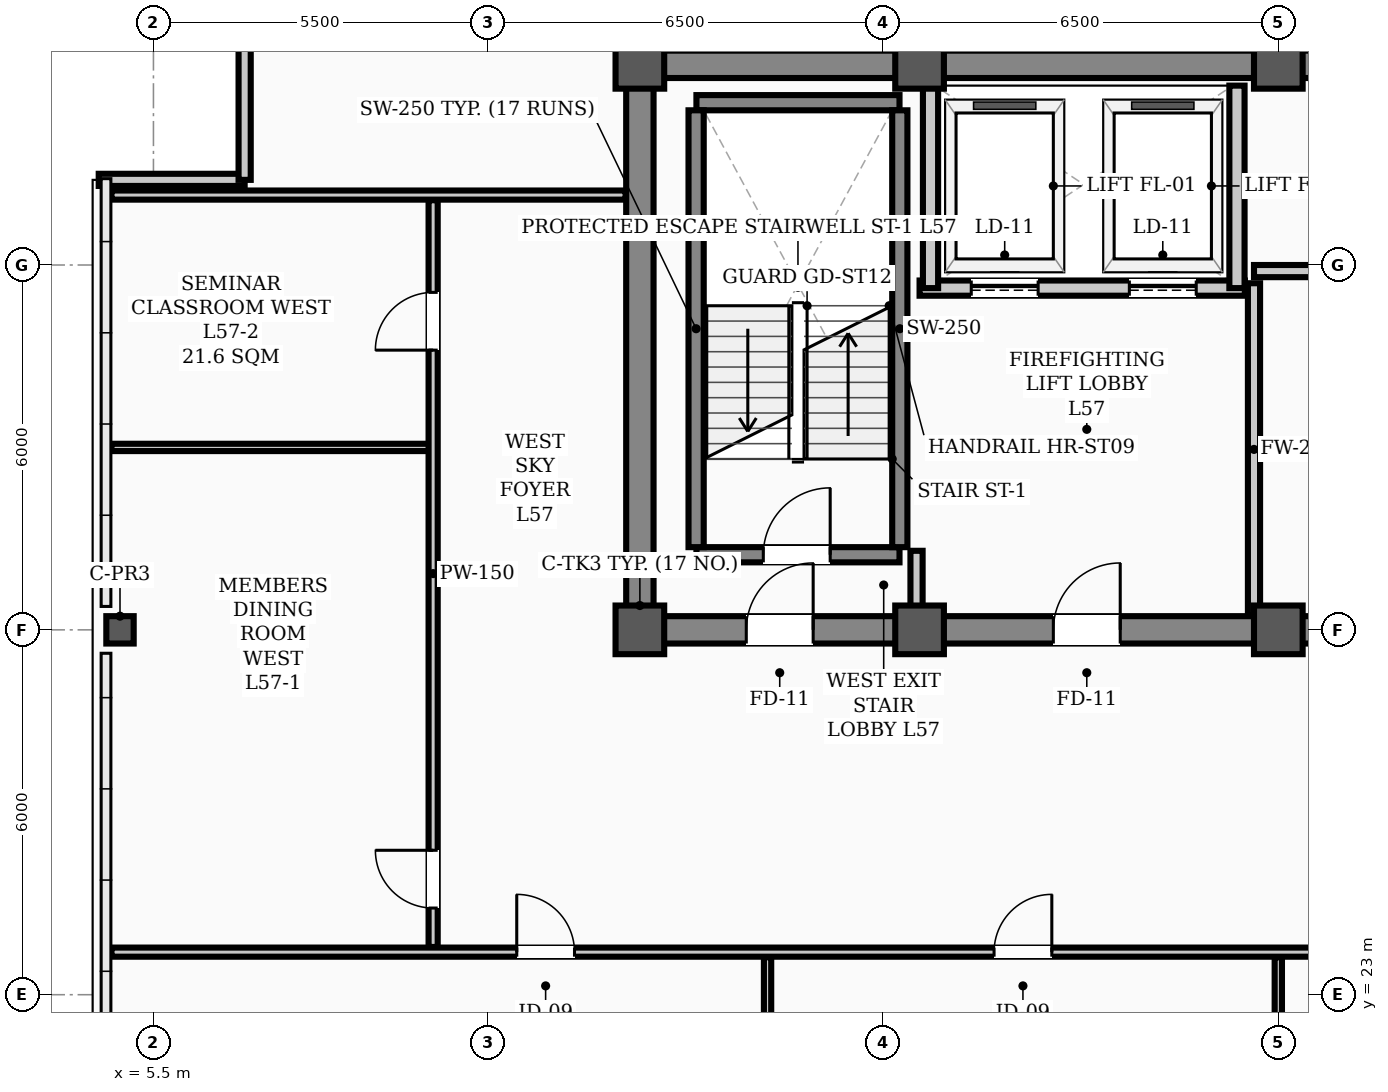
"""IFC4 building model, lengths in metres.
Left out: names, types, materials, properties, quantities, classifications, styles, units other than length and angle.
Written with IfcOpenShell. Run it as: python <this file> out.ifc"""

import sys

from ifc_helpers import new_model, si_unit, direction, frame, frame_2d, origin, origin_2d, place, context, subcontext, project, spatial, rectangle, hollow_rectangle, extrude, element, fill, save


model = new_model("IFC4")
c1 = context("Model", 3, precision=1e-05, world=origin(), true_north=direction((0.0, 1.0)))
c2 = subcontext(c1, "Body", "Model", "MODEL_VIEW")
j1 = project(units=[si_unit("LENGTHUNIT", "METRE"), si_unit("PLANEANGLEUNIT", "RADIAN")], contexts=[c1])
p1 = place(None, origin())
s1 = spatial("IfcSite", under=j1, at=p1, CompositionType="ELEMENT")
p2 = place(p1, origin())
s2 = spatial("IfcBuilding", under=s1, at=p2, CompositionType="ELEMENT")
p3 = place(p2, frame((0.0, 0.0, 230.6)))
s3 = spatial("IfcBuildingStorey", under=s2, at=p3, CompositionType="ELEMENT", Elevation=230.6)
for number, where, z_axis, x_axis in (
    (1, (13.5, 29.0, 0.0), (0.0, 0.0, 1.0), (1.0, 0.0, 0.0)),
    (2, (13.5, 38.3, 0.0), (0.0, 0.0, 1.0), (1.0, 0.0, 0.0)),
    (3, (18.1, 29.0, 0.0), (0.0, 0.0, 1.0), (1.0, 0.0, 0.0)),
    (4, (18.1, 38.3, 0.0), (0.0, 0.0, 1.0), (1.0, 0.0, 0.0)),
    (5, (24.0, 29.0, 0.0), (0.0, 0.0, 1.0), (1.0, 0.0, 0.0)),
    (6, (24.0, 38.3, 0.0), (0.0, 0.0, 1.0), (1.0, 0.0, 0.0)),
):
    element("IfcColumn", number, at=place(p3, frame(where, z_axis=z_axis, x_axis=x_axis)), inside=s3, PredefinedType="COLUMN", context=c2, shape_type="SweptSolid", body=[
        extrude(hollow_rectangle(XDim=0.8, YDim=0.8, WallThickness=0.032, InnerFilletRadius=0.016, OuterFilletRadius=0.048, at=origin_2d()), origin(), (0.0, 0.0, 1.0), 3.9),
    ])
p4 = place(p3, frame((4.95, 29.0, 0.0), z_axis=(0.0, 0.0, 1.0), x_axis=(1.0, 0.0, 0.0)))
e7 = element("IfcColumn", 7, at=p4, inside=s3, PredefinedType="COLUMN", context=c2, shape_type="SweptSolid", body=[
    extrude(hollow_rectangle(XDim=0.45, YDim=0.45, WallThickness=0.022, InnerFilletRadius=0.022, OuterFilletRadius=0.044, at=origin_2d()), origin(), (0.0, 0.0, 1.0), 3.9),
])
p5 = place(p3, frame((4.6, 36.4, 0.0), z_axis=(0.0, 0.0, 1.0), x_axis=(1.0, 0.0, 0.0)))
e8 = element("IfcWall", 8, at=p5, inside=s3, PredefinedType="PARAPET", context=c2, shape_type="SweptSolid", body=[
    extrude(rectangle(XDim=2.4, YDim=0.2, at=frame_2d((1.2, 0.0))), origin(), (0.0, 0.0, 1.0), 1.2),
])
p6 = place(p3, frame((7.0, 36.4, 0.0), z_axis=(0.0, 0.0, 1.0), x_axis=(0.0, 1.0, 0.0)))
e9 = element("IfcWall", 9, at=p6, inside=s3, PredefinedType="PARAPET", context=c2, shape_type="SweptSolid", body=[
    extrude(rectangle(XDim=2.4, YDim=0.2, at=frame_2d((1.2, 0.0))), origin(), (0.0, 0.0, 1.0), 1.2),
])
p7 = place(p3, frame((13.5, 29.0, 0.0), z_axis=(0.0, 0.0, 1.0), x_axis=(1.0, 0.0, 0.0)))
e10 = element("IfcWall", 10, at=p7, inside=s3, PredefinedType="SHEAR", context=c2, shape_type="SweptSolid", body=[
    extrude(rectangle(XDim=30.5, YDim=0.45, at=frame_2d((15.25, 0.0))), origin(), (0.0, 0.0, 1.0), 3.72),
])
p8 = place(p7, frame((1.75, 0.0, 0.0)))
e11 = element("IfcOpeningElement", 11, at=p8, cuts=e10, PredefinedType="OPENING", context=c2, shape_type="SweptSolid", body=[
    extrude(rectangle(XDim=1.1, YDim=2.08, at=frame_2d((0.55, 1.04))), frame((0.0, 0.235, 0.0), z_axis=(0.0, -1.0, 0.0), x_axis=(1.0, 0.0, 0.0)), (0.0, 0.0, 1.0), 0.47),
])
p9 = place(p7, frame((26.7, 0.0, 0.0)))
e12 = element("IfcOpeningElement", 12, at=p9, cuts=e10, PredefinedType="OPENING", context=c2, shape_type="SweptSolid", body=[
    extrude(rectangle(XDim=1.1, YDim=2.08, at=frame_2d((0.55, 1.04))), frame((0.0, 0.235, 0.0), z_axis=(0.0, -1.0, 0.0), x_axis=(1.0, 0.0, 0.0)), (0.0, 0.0, 1.0), 0.47),
])
p10 = place(p7, frame((6.8, 0.0, 0.0)))
e13 = element("IfcOpeningElement", 13, at=p10, cuts=e10, PredefinedType="OPENING", context=c2, shape_type="SweptSolid", body=[
    extrude(rectangle(XDim=1.1, YDim=2.08, at=frame_2d((0.55, 1.04))), frame((0.0, 0.235, 0.0), z_axis=(0.0, -1.0, 0.0), x_axis=(1.0, 0.0, 0.0)), (0.0, 0.0, 1.0), 0.47),
])
p11 = place(p7, frame((13.2, 0.0, 0.0)))
e14 = element("IfcOpeningElement", 14, at=p11, cuts=e10, PredefinedType="OPENING", context=c2, shape_type="SweptSolid", body=[
    extrude(rectangle(XDim=1.6, YDim=2.08, at=frame_2d((0.8, 1.04))), frame((0.0, 0.235, 0.0), z_axis=(0.0, -1.0, 0.0), x_axis=(1.0, 0.0, 0.0)), (0.0, 0.0, 1.0), 0.47),
])
p12 = place(p7, frame((19.5, 0.0, 0.0)))
e15 = element("IfcOpeningElement", 15, at=p12, cuts=e10, PredefinedType="OPENING", context=c2, shape_type="SweptSolid", body=[
    extrude(rectangle(XDim=0.9, YDim=2.08, at=frame_2d((0.45, 1.04))), frame((0.0, 0.235, 0.0), z_axis=(0.0, -1.0, 0.0), x_axis=(1.0, 0.0, 0.0)), (0.0, 0.0, 1.0), 0.47),
])
p13 = place(p7, frame((21.55, 0.0, 0.0)))
e16 = element("IfcOpeningElement", 16, at=p13, cuts=e10, PredefinedType="OPENING", context=c2, shape_type="SweptSolid", body=[
    extrude(rectangle(XDim=0.9, YDim=2.08, at=frame_2d((0.45, 1.04))), frame((0.0, 0.235, 0.0), z_axis=(0.0, -1.0, 0.0), x_axis=(1.0, 0.0, 0.0)), (0.0, 0.0, 1.0), 0.47),
])
p14 = place(p3, frame((13.5, 38.3, 0.0), z_axis=(0.0, 0.0, 1.0), x_axis=(1.0, 0.0, 0.0)))
e17 = element("IfcWall", 17, at=p14, inside=s3, PredefinedType="SHEAR", context=c2, shape_type="SweptSolid", body=[
    extrude(rectangle(XDim=30.5, YDim=0.45, at=frame_2d((15.25, 0.0))), origin(), (0.0, 0.0, 1.0), 3.72),
])
p15 = place(p3, frame((13.5, 29.35, 0.0), z_axis=(0.0, 0.0, 1.0), x_axis=(0.0, 1.0, 0.0)))
e18 = element("IfcWall", 18, at=p15, inside=s3, PredefinedType="SHEAR", context=c2, shape_type="SweptSolid", body=[
    extrude(rectangle(XDim=8.6, YDim=0.45, at=frame_2d((4.3, 0.0))), origin(), (0.0, 0.0, 1.0), 3.72),
])
p16 = place(p3, frame((14.43, 30.235, 0.0), z_axis=(0.0, 0.0, 1.0), x_axis=(1.0, 0.0, 0.0)))
e19 = element("IfcWall", 19, at=p16, inside=s3, PredefinedType="STANDARD", context=c2, shape_type="SweptSolid", body=[
    extrude(rectangle(XDim=3.34, YDim=0.25, at=frame_2d((1.67, 0.0))), origin(), (0.0, 0.0, 1.0), 3.72),
])
p17 = place(p16, frame((1.1, 0.0, 0.0)))
e20 = element("IfcOpeningElement", 20, at=p17, cuts=e19, PredefinedType="OPENING", context=c2, shape_type="SweptSolid", body=[
    extrude(rectangle(XDim=1.1, YDim=2.08, at=frame_2d((0.55, 1.04))), frame((0.0, 0.135, 0.0), z_axis=(0.0, -1.0, 0.0), x_axis=(1.0, 0.0, 0.0)), (0.0, 0.0, 1.0), 0.27),
])
p18 = place(p3, frame((14.43, 37.669, 0.0), z_axis=(0.0, 0.0, 1.0), x_axis=(1.0, 0.0, 0.0)))
e21 = element("IfcWall", 21, at=p18, inside=s3, PredefinedType="STANDARD", context=c2, shape_type="SweptSolid", body=[
    extrude(rectangle(XDim=3.34, YDim=0.25, at=frame_2d((1.67, 0.0))), origin(), (0.0, 0.0, 1.0), 3.72),
])
for number, where, z_axis, x_axis in (
    (22, (14.425, 30.36, 0.0), (0.0, 0.0, 1.0), (0.0, 1.0, 0.0)),
    (23, (17.775, 30.36, 0.0), (0.0, 0.0, 1.0), (0.0, 1.0, 0.0)),
):
    element("IfcWall", number, at=place(p3, frame(where, z_axis=z_axis, x_axis=x_axis)), inside=s3, PredefinedType="STANDARD", context=c2, shape_type="SweptSolid", body=[
        extrude(rectangle(XDim=7.184, YDim=0.25, at=frame_2d((3.592, 0.0))), origin(), (0.0, 0.0, 1.0), 3.72),
    ])
p19 = place(p3, frame((18.1, 34.62, 0.0), z_axis=(0.0, 0.0, 1.0), x_axis=(1.0, 0.0, 0.0)))
e24 = element("IfcWall", 24, at=p19, inside=s3, PredefinedType="STANDARD", context=c2, shape_type="SweptSolid", body=[
    extrude(rectangle(XDim=5.35, YDim=0.25, at=frame_2d((2.675, 0.0))), origin(), (0.0, 0.0, 1.0), 3.72),
])
p20 = place(p19, frame((0.85, 0.0, 0.0)))
e25 = element("IfcOpeningElement", 25, at=p20, cuts=e24, PredefinedType="OPENING", context=c2, shape_type="SweptSolid", body=[
    extrude(rectangle(XDim=1.1, YDim=2.08, at=frame_2d((0.55, 1.04))), frame((0.0, 0.135, 0.0), z_axis=(0.0, -1.0, 0.0), x_axis=(1.0, 0.0, 0.0)), (0.0, 0.0, 1.0), 0.27),
])
p21 = place(p19, frame((3.45, 0.0, 0.0)))
e26 = element("IfcOpeningElement", 26, at=p21, cuts=e24, PredefinedType="OPENING", context=c2, shape_type="SweptSolid", body=[
    extrude(rectangle(XDim=1.1, YDim=2.08, at=frame_2d((0.55, 1.04))), frame((0.0, 0.135, 0.0), z_axis=(0.0, -1.0, 0.0), x_axis=(1.0, 0.0, 0.0)), (0.0, 0.0, 1.0), 0.27),
])
for number, where, z_axis, x_axis in (
    (27, (18.28, 34.62, 0.0), (0.0, 0.0, 1.0), (0.0, 1.0, 0.0)),
    (28, (23.32, 34.62, 0.0), (0.0, 0.0, 1.0), (0.0, 1.0, 0.0)),
):
    element("IfcWall", number, at=place(p3, frame(where, z_axis=z_axis, x_axis=x_axis)), inside=s3, PredefinedType="STANDARD", context=c2, shape_type="SweptSolid", body=[
        extrude(rectangle(XDim=3.33, YDim=0.25, at=frame_2d((1.665, 0.0))), origin(), (0.0, 0.0, 1.0), 3.72),
    ])
p22 = place(p3, frame((23.6, 34.9, 0.0), z_axis=(0.0, 0.0, 1.0), x_axis=(1.0, 0.0, 0.0)))
e29 = element("IfcWall", 29, at=p22, inside=s3, PredefinedType="STANDARD", context=c2, shape_type="SweptSolid", body=[
    extrude(rectangle(XDim=8.18, YDim=0.2, at=frame_2d((4.09, 0.0))), origin(), (0.0, 0.0, 1.0), 3.72),
])
p23 = place(p22, frame((3.45, 0.0, 0.0)))
e30 = element("IfcOpeningElement", 30, at=p23, cuts=e29, PredefinedType="OPENING", context=c2, shape_type="SweptSolid", body=[
    extrude(rectangle(XDim=1.1, YDim=2.08, at=frame_2d((0.55, 1.04))), frame((0.0, 0.11, 0.0), z_axis=(0.0, -1.0, 0.0), x_axis=(1.0, 0.0, 0.0)), (0.0, 0.0, 1.0), 0.22),
])
p24 = place(p3, frame((4.81, 23.7, 0.0), z_axis=(0.0, 0.0, 1.0), x_axis=(1.0, 0.0, 0.0)))
e31 = element("IfcWall", 31, at=p24, inside=s3, PredefinedType="PARTITIONING", context=c2, shape_type="SweptSolid", body=[
    extrude(rectangle(XDim=40.88, YDim=0.15, at=frame_2d((20.44, 0.0))), origin(), (0.0, 0.0, 1.0), 3.2),
])
p25 = place(p24, frame((6.665, 0.0, 0.0)))
e32 = element("IfcOpeningElement", 32, at=p25, cuts=e31, PredefinedType="OPENING", context=c2, shape_type="SweptSolid", body=[
    extrude(rectangle(XDim=0.95, YDim=2.08, at=frame_2d((0.475, 1.04))), frame((0.0, 0.085, 0.0), z_axis=(0.0, -1.0, 0.0), x_axis=(1.0, 0.0, 0.0)), (0.0, 0.0, 1.0), 0.17),
])
p26 = place(p24, frame((14.515, 0.0, 0.0)))
e33 = element("IfcOpeningElement", 33, at=p26, cuts=e31, PredefinedType="OPENING", context=c2, shape_type="SweptSolid", body=[
    extrude(rectangle(XDim=0.95, YDim=2.08, at=frame_2d((0.475, 1.04))), frame((0.0, 0.085, 0.0), z_axis=(0.0, -1.0, 0.0), x_axis=(1.0, 0.0, 0.0)), (0.0, 0.0, 1.0), 0.17),
])
p27 = place(p24, frame((23.115, 0.0, 0.0)))
e34 = element("IfcOpeningElement", 34, at=p27, cuts=e31, PredefinedType="OPENING", context=c2, shape_type="SweptSolid", body=[
    extrude(rectangle(XDim=0.95, YDim=2.08, at=frame_2d((0.475, 1.04))), frame((0.0, 0.085, 0.0), z_axis=(0.0, -1.0, 0.0), x_axis=(1.0, 0.0, 0.0)), (0.0, 0.0, 1.0), 0.17),
])
p28 = place(p24, frame((28.565, 0.0, 0.0)))
e35 = element("IfcOpeningElement", 35, at=p28, cuts=e31, PredefinedType="OPENING", context=c2, shape_type="SweptSolid", body=[
    extrude(rectangle(XDim=0.95, YDim=2.08, at=frame_2d((0.475, 1.04))), frame((0.0, 0.085, 0.0), z_axis=(0.0, -1.0, 0.0), x_axis=(1.0, 0.0, 0.0)), (0.0, 0.0, 1.0), 0.17),
])
p29 = place(p24, frame((36.965, 0.0, 0.0)))
e36 = element("IfcOpeningElement", 36, at=p29, cuts=e31, PredefinedType="OPENING", context=c2, shape_type="SweptSolid", body=[
    extrude(rectangle(XDim=0.95, YDim=2.08, at=frame_2d((0.475, 1.04))), frame((0.0, 0.085, 0.0), z_axis=(0.0, -1.0, 0.0), x_axis=(1.0, 0.0, 0.0)), (0.0, 0.0, 1.0), 0.17),
])
p30 = place(p3, frame((4.81, 36.15, 0.0), z_axis=(0.0, 0.0, 1.0), x_axis=(1.0, 0.0, 0.0)))
e37 = element("IfcWall", 37, at=p30, inside=s3, PredefinedType="PARTITIONING", context=c2, shape_type="SweptSolid", body=[
    extrude(rectangle(XDim=8.455, YDim=0.15, at=frame_2d((4.228, 0.0))), origin(), (0.0, 0.0, 1.0), 3.2),
])
p31 = place(p3, frame((4.81, 32.0, 0.0), z_axis=(0.0, 0.0, 1.0), x_axis=(1.0, 0.0, 0.0)))
e38 = element("IfcWall", 38, at=p31, inside=s3, PredefinedType="PARTITIONING", context=c2, shape_type="SweptSolid", body=[
    extrude(rectangle(XDim=5.29, YDim=0.12, at=frame_2d((2.645, 0.0))), origin(), (0.0, 0.0, 1.0), 3.72),
])
p32 = place(p3, frame((18.05, 29.235, 0.0), z_axis=(0.0, 0.0, 1.0), x_axis=(0.0, 1.0, 0.0)))
e39 = element("IfcWall", 39, at=p32, inside=s3, PredefinedType="STANDARD", context=c2, shape_type="SweptSolid", body=[
    extrude(rectangle(XDim=1.065, YDim=0.2, at=frame_2d((0.532, 0.0))), origin(), (0.0, 0.0, 1.0), 3.35),
])
p33 = place(p3, frame((23.6, 29.235, 0.0), z_axis=(0.0, 0.0, 1.0), x_axis=(0.0, 1.0, 0.0)))
e40 = element("IfcWall", 40, at=p33, inside=s3, PredefinedType="STANDARD", context=c2, shape_type="SweptSolid", body=[
    extrude(rectangle(XDim=5.465, YDim=0.2, at=frame_2d((2.732, 0.0))), origin(), (0.0, 0.0, 1.0), 3.2),
])
p34 = place(p3, frame((10.1, 23.785, 0.0), z_axis=(0.0, 0.0, 1.0), x_axis=(0.0, 1.0, 0.0)))
e41 = element("IfcWall", 41, at=p34, inside=s3, PredefinedType="PARTITIONING", context=c2, shape_type="SweptSolid", body=[
    extrude(rectangle(XDim=12.28, YDim=0.15, at=frame_2d((6.14, 0.0))), origin(), (0.0, 0.0, 1.0), 3.1),
])
p35 = place(p34, frame((0.64, 0.0, 0.0)))
e42 = element("IfcOpeningElement", 42, at=p35, cuts=e41, PredefinedType="OPENING", context=c2, shape_type="SweptSolid", body=[
    extrude(rectangle(XDim=0.95, YDim=2.08, at=frame_2d((0.475, 1.04))), frame((0.0, 0.085, 0.0), z_axis=(0.0, -1.0, 0.0), x_axis=(1.0, 0.0, 0.0)), (0.0, 0.0, 1.0), 0.17),
])
p36 = place(p34, frame((9.815, 0.0, 0.0)))
e43 = element("IfcOpeningElement", 43, at=p36, cuts=e41, PredefinedType="OPENING", context=c2, shape_type="SweptSolid", body=[
    extrude(rectangle(XDim=0.95, YDim=2.08, at=frame_2d((0.475, 1.04))), frame((0.0, 0.085, 0.0), z_axis=(0.0, -1.0, 0.0), x_axis=(1.0, 0.0, 0.0)), (0.0, 0.0, 1.0), 0.17),
])
p37 = place(p3, frame((15.6, 12.41, 0.0), z_axis=(0.0, 0.0, 1.0), x_axis=(0.0, 1.0, 0.0)))
e44 = element("IfcWall", 44, at=p37, inside=s3, PredefinedType="PARTITIONING", context=c2, shape_type="SweptSolid", body=[
    extrude(rectangle(XDim=11.205, YDim=0.12, at=frame_2d((5.603, 0.0))), origin(), (0.0, 0.0, 1.0), 3.1),
])
p38 = place(p3, frame((24.0, 14.17, 0.0), z_axis=(0.0, 0.0, 1.0), x_axis=(0.0, 1.0, 0.0)))
e45 = element("IfcWall", 45, at=p38, inside=s3, PredefinedType="PARTITIONING", context=c2, shape_type="SweptSolid", body=[
    extrude(rectangle(XDim=9.445, YDim=0.12, at=frame_2d((4.723, 0.0))), origin(), (0.0, 0.0, 1.0), 3.1),
])
p39 = place(p17, origin())
e46 = element("IfcDoor", 46, at=p39, inside=s3, OperationType="SINGLE_SWING_RIGHT", PredefinedType="DOOR", context=c2, shape_type="SweptSolid", body=[
    extrude(rectangle(XDim=1.1, YDim=2.08, at=frame_2d((0.55, 1.04))), frame((0.0, 0.025, 0.0), z_axis=(0.0, -1.0, 0.0), x_axis=(1.0, 0.0, 0.0)), (0.0, 0.0, 1.0), 0.05),
])
fill(e20, e46)
p40 = place(p8, origin())
e47 = element("IfcDoor", 47, at=p40, inside=s3, OperationType="SINGLE_SWING_RIGHT", PredefinedType="DOOR", context=c2, shape_type="SweptSolid", body=[
    extrude(rectangle(XDim=1.1, YDim=2.08, at=frame_2d((0.55, 1.04))), frame((0.0, 0.025, 0.0), z_axis=(0.0, -1.0, 0.0), x_axis=(1.0, 0.0, 0.0)), (0.0, 0.0, 1.0), 0.05),
])
fill(e11, e47)
p41 = place(p10, origin())
e48 = element("IfcDoor", 48, at=p41, inside=s3, OperationType="SINGLE_SWING_RIGHT", PredefinedType="DOOR", context=c2, shape_type="SweptSolid", body=[
    extrude(rectangle(XDim=1.1, YDim=2.08, at=frame_2d((0.55, 1.04))), frame((0.0, 0.025, 0.0), z_axis=(0.0, -1.0, 0.0), x_axis=(1.0, 0.0, 0.0)), (0.0, 0.0, 1.0), 0.05),
])
fill(e13, e48)
p42 = place(p25, origin())
e49 = element("IfcDoor", 49, at=p42, inside=s3, OperationType="SINGLE_SWING_LEFT", PredefinedType="DOOR", context=c2, shape_type="SweptSolid", body=[
    extrude(rectangle(XDim=0.95, YDim=2.08, at=frame_2d((0.475, 1.04))), frame((0.0, 0.025, 0.0), z_axis=(0.0, -1.0, 0.0), x_axis=(1.0, 0.0, 0.0)), (0.0, 0.0, 1.0), 0.05),
])
fill(e32, e49)
p43 = place(p26, origin())
e50 = element("IfcDoor", 50, at=p43, inside=s3, OperationType="SINGLE_SWING_RIGHT", PredefinedType="DOOR", context=c2, shape_type="SweptSolid", body=[
    extrude(rectangle(XDim=0.95, YDim=2.08, at=frame_2d((0.475, 1.04))), frame((0.0, 0.025, 0.0), z_axis=(0.0, -1.0, 0.0), x_axis=(1.0, 0.0, 0.0)), (0.0, 0.0, 1.0), 0.05),
])
fill(e33, e50)
p44 = place(p35, origin())
e51 = element("IfcDoor", 51, at=p44, inside=s3, OperationType="SINGLE_SWING_RIGHT", PredefinedType="DOOR", context=c2, shape_type="SweptSolid", body=[
    extrude(rectangle(XDim=0.95, YDim=2.08, at=frame_2d((0.475, 1.04))), frame((0.0, 0.025, 0.0), z_axis=(0.0, -1.0, 0.0), x_axis=(1.0, 0.0, 0.0)), (0.0, 0.0, 1.0), 0.05),
])
fill(e42, e51)
p45 = place(p36, origin())
e52 = element("IfcDoor", 52, at=p45, inside=s3, OperationType="SINGLE_SWING_LEFT", PredefinedType="DOOR", context=c2, shape_type="SweptSolid", body=[
    extrude(rectangle(XDim=0.95, YDim=2.08, at=frame_2d((0.475, 1.04))), frame((0.0, 0.025, 0.0), z_axis=(0.0, -1.0, 0.0), x_axis=(1.0, 0.0, 0.0)), (0.0, 0.0, 1.0), 0.05),
])
fill(e43, e52)
p46 = place(p20, origin())
e53 = element("IfcDoor", 53, at=p46, inside=s3, OperationType="SLIDING_TO_LEFT", PredefinedType="DOOR", context=c2, shape_type="SweptSolid", body=[
    extrude(rectangle(XDim=1.1, YDim=2.08, at=frame_2d((0.55, 1.04))), frame((0.0, 0.025, 0.0), z_axis=(0.0, -1.0, 0.0), x_axis=(1.0, 0.0, 0.0)), (0.0, 0.0, 1.0), 0.05),
])
fill(e25, e53)
p47 = place(p21, origin())
e54 = element("IfcDoor", 54, at=p47, inside=s3, OperationType="SLIDING_TO_LEFT", PredefinedType="DOOR", context=c2, shape_type="SweptSolid", body=[
    extrude(rectangle(XDim=1.1, YDim=2.08, at=frame_2d((0.55, 1.04))), frame((0.0, 0.025, 0.0), z_axis=(0.0, -1.0, 0.0), x_axis=(1.0, 0.0, 0.0)), (0.0, 0.0, 1.0), 0.05),
])
fill(e26, e54)
save(model, sys.argv[1])
